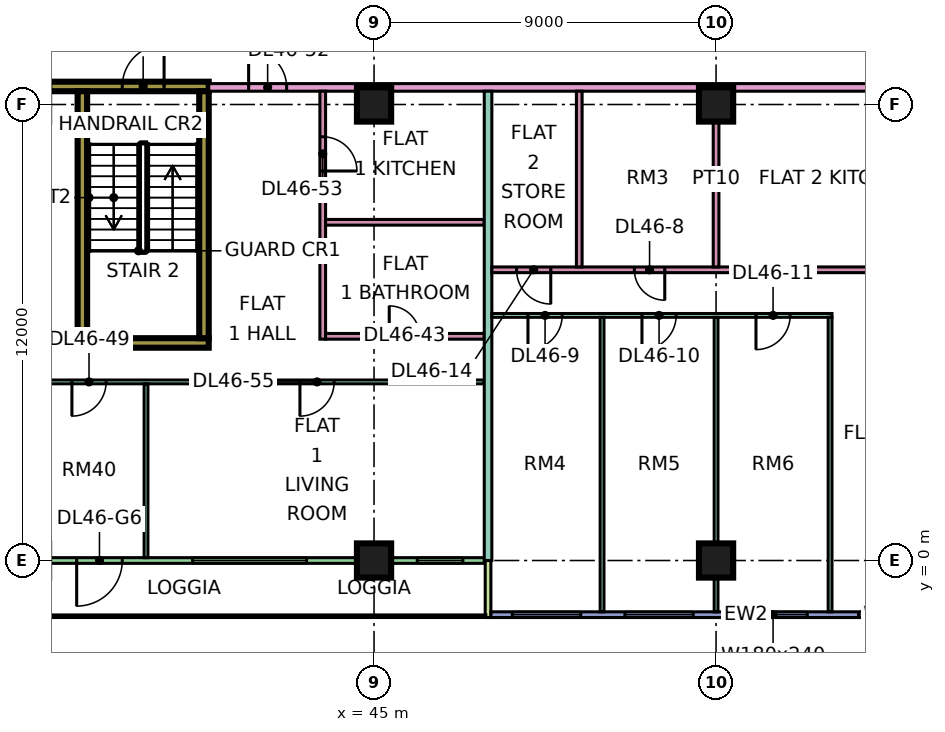
"""IFC4 building model, lengths in metres.
Left out: names, types, materials, properties, quantities, classifications, styles, units other than length and angle.
Written with IfcOpenShell. Run it as: python <this file> out.ifc"""

import sys

from ifc_helpers import new_model, si_unit, direction, frame, frame_2d, origin, origin_2d, place, context, subcontext, project, spatial, rectangle, extrude, element, fill, save


model = new_model("IFC4")
c1 = context("Model", 3, precision=1e-05, world=origin(), true_north=direction((0.0, 1.0)))
c2 = subcontext(c1, "Body", "Model", "MODEL_VIEW")
j1 = project(units=[si_unit("LENGTHUNIT", "METRE"), si_unit("PLANEANGLEUNIT", "RADIAN")], contexts=[c1])
p1 = place(None, origin())
s1 = spatial("IfcSite", under=j1, at=p1, CompositionType="ELEMENT")
p2 = place(p1, origin())
s2 = spatial("IfcBuilding", under=s1, at=p2, CompositionType="ELEMENT")
p3 = place(p2, frame((0.0, 0.0, 198.65)))
s3 = spatial("IfcBuildingStorey", under=s2, at=p3, CompositionType="ELEMENT", Elevation=198.65)
for number, where, z_axis, x_axis in (
    (1, (45.0, 0.0, 0.0), (0.0, 0.0, 1.0), (1.0, 0.0, 0.0)),
    (2, (45.0, 12.0, 0.0), (0.0, 0.0, 1.0), (1.0, 0.0, 0.0)),
    (3, (54.0, 0.0, 0.0), (0.0, 0.0, 1.0), (1.0, 0.0, 0.0)),
    (4, (54.0, 12.0, 0.0), (0.0, 0.0, 1.0), (1.0, 0.0, 0.0)),
):
    element("IfcColumn", number, at=place(p3, frame(where, z_axis=z_axis, x_axis=x_axis)), inside=s3, PredefinedType="COLUMN", context=c2, shape_type="SweptSolid", body=[
        extrude(rectangle(XDim=0.9, YDim=0.9, at=origin_2d()), origin(), (0.0, 0.0, 1.0), 3.75),
    ])
p4 = place(p3, frame((37.2, 5.725, 0.0), z_axis=(0.0, 0.0, 1.0), x_axis=(1.0, 0.0, 0.0)))
e5 = element("IfcWall", 5, at=p4, inside=s3, PredefinedType="SHEAR", context=c2, shape_type="SweptSolid", body=[
    extrude(rectangle(XDim=3.45, YDim=0.25, at=frame_2d((1.725, 0.0))), origin(), (0.0, 0.0, 1.0), 3.75),
])
p5 = place(p3, frame((36.45, 12.475, 0.0), z_axis=(0.0, 0.0, 1.0), x_axis=(1.0, 0.0, 0.0)))
e6 = element("IfcWall", 6, at=p5, inside=s3, PredefinedType="SHEAR", context=c2, shape_type="SweptSolid", body=[
    extrude(rectangle(XDim=4.2, YDim=0.25, at=frame_2d((2.1, 0.0))), origin(), (0.0, 0.0, 1.0), 3.75),
])
p6 = place(p5, frame((1.925, 0.0, 0.0)))
e7 = element("IfcOpeningElement", 7, at=p6, cuts=e6, PredefinedType="OPENING", context=c2, shape_type="SweptSolid", body=[
    extrude(rectangle(XDim=1.1, YDim=2.2, at=frame_2d((0.55, 1.1))), frame((0.0, 0.135, 0.0), z_axis=(0.0, -1.0, 0.0), x_axis=(1.0, 0.0, 0.0)), (0.0, 0.0, 1.0), 0.27),
])
for number, where, z_axis, x_axis in (
    (8, (37.325, 5.85, 0.0), (0.0, 0.0, 1.0), (0.0, 1.0, 0.0)),
    (9, (40.525, 5.85, 0.0), (0.0, 0.0, 1.0), (0.0, 1.0, 0.0)),
):
    element("IfcWall", number, at=place(p3, frame(where, z_axis=z_axis, x_axis=x_axis)), inside=s3, PredefinedType="SHEAR", context=c2, shape_type="SweptSolid", body=[
        extrude(rectangle(XDim=6.5, YDim=0.25, at=frame_2d((3.25, 0.0))), origin(), (0.0, 0.0, 1.0), 3.75),
    ])
p7 = place(p3, frame((36.075, 0.0, 0.0), z_axis=(0.0, 0.0, 1.0), x_axis=(1.0, 0.0, 0.0)))
e10 = element("IfcWall", 10, at=p7, inside=s3, PredefinedType="SOLIDWALL", context=c2, shape_type="SweptSolid", body=[
    extrude(rectangle(XDim=11.85, YDim=0.15, at=frame_2d((5.925, 0.0))), origin(), (0.0, 0.0, 1.0), 3.35),
])
p8 = place(p7, frame((1.1, 0.0, 0.0)))
e11 = element("IfcOpeningElement", 11, at=p8, cuts=e10, PredefinedType="OPENING", context=c2, shape_type="SweptSolid", body=[
    extrude(rectangle(XDim=1.2, YDim=2.4, at=frame_2d((0.6, 1.2))), frame((0.0, 0.085, 0.0), z_axis=(0.0, -1.0, 0.0), x_axis=(1.0, 0.0, 0.0)), (0.0, 0.0, 1.0), 0.17),
])
p9 = place(p7, frame((4.15, 0.0, 0.45)))
e12 = element("IfcOpeningElement", 12, at=p9, cuts=e10, PredefinedType="OPENING", context=c2, shape_type="SweptSolid", body=[
    extrude(rectangle(XDim=3.0, YDim=2.4, at=frame_2d((1.5, 1.2))), frame((0.0, 0.085, 0.0), z_axis=(0.0, -1.0, 0.0), x_axis=(1.0, 0.0, 0.0)), (0.0, 0.0, 1.0), 0.17),
])
p10 = place(p7, frame((10.062, 0.0, 0.45)))
e13 = element("IfcOpeningElement", 13, at=p10, cuts=e10, PredefinedType="OPENING", context=c2, shape_type="SweptSolid", body=[
    extrude(rectangle(XDim=1.2, YDim=2.4, at=frame_2d((0.6, 1.2))), frame((0.0, 0.085, 0.0), z_axis=(0.0, -1.0, 0.0), x_axis=(1.0, 0.0, 0.0)), (0.0, 0.0, 1.0), 0.17),
])
p11 = place(p3, frame((48.0, -1.5, 0.0), z_axis=(0.0, 0.0, 1.0), x_axis=(0.0, 1.0, 0.0)))
e14 = element("IfcWall", 14, at=p11, inside=s3, PredefinedType="SOLIDWALL", context=c2, shape_type="SweptSolid", body=[
    extrude(rectangle(XDim=1.5, YDim=0.15, at=frame_2d((0.75, 0.0))), origin(), (0.0, 0.0, 1.0), 3.35),
])
p12 = place(p3, frame((48.075, -1.425, 0.0), z_axis=(0.0, 0.0, 1.0), x_axis=(1.0, 0.0, 0.0)))
e15 = element("IfcWall", 15, at=p12, inside=s3, PredefinedType="SOLIDWALL", context=c2, shape_type="SweptSolid", body=[
    extrude(rectangle(XDim=13.425, YDim=0.15, at=frame_2d((6.712, 0.0))), origin(), (0.0, 0.0, 1.0), 3.35),
])
p13 = place(p12, frame((0.562, 0.0, 0.45)))
e16 = element("IfcOpeningElement", 16, at=p13, cuts=e15, PredefinedType="OPENING", context=c2, shape_type="SweptSolid", body=[
    extrude(rectangle(XDim=1.8, YDim=2.4, at=frame_2d((0.9, 1.2))), frame((0.0, 0.085, 0.0), z_axis=(0.0, -1.0, 0.0), x_axis=(1.0, 0.0, 0.0)), (0.0, 0.0, 1.0), 0.17),
])
p14 = place(p12, frame((3.525, 0.0, 0.45)))
e17 = element("IfcOpeningElement", 17, at=p14, cuts=e15, PredefinedType="OPENING", context=c2, shape_type="SweptSolid", body=[
    extrude(rectangle(XDim=1.8, YDim=2.4, at=frame_2d((0.9, 1.2))), frame((0.0, 0.085, 0.0), z_axis=(0.0, -1.0, 0.0), x_axis=(1.0, 0.0, 0.0)), (0.0, 0.0, 1.0), 0.17),
])
p15 = place(p12, frame((6.525, 0.0, 0.45)))
e18 = element("IfcOpeningElement", 18, at=p15, cuts=e15, PredefinedType="OPENING", context=c2, shape_type="SweptSolid", body=[
    extrude(rectangle(XDim=1.8, YDim=2.4, at=frame_2d((0.9, 1.2))), frame((0.0, 0.085, 0.0), z_axis=(0.0, -1.0, 0.0), x_axis=(1.0, 0.0, 0.0)), (0.0, 0.0, 1.0), 0.17),
])
p16 = place(p12, frame((9.675, 0.0, 0.45)))
e19 = element("IfcOpeningElement", 19, at=p16, cuts=e15, PredefinedType="OPENING", context=c2, shape_type="SweptSolid", body=[
    extrude(rectangle(XDim=3.0, YDim=2.4, at=frame_2d((1.5, 1.2))), frame((0.0, 0.085, 0.0), z_axis=(0.0, -1.0, 0.0), x_axis=(1.0, 0.0, 0.0)), (0.0, 0.0, 1.0), 0.17),
])
p17 = place(p3, frame((33.05, 4.7, 0.0), z_axis=(0.0, 0.0, 1.0), x_axis=(1.0, 0.0, 0.0)))
e20 = element("IfcWall", 20, at=p17, inside=s3, PredefinedType="PARTITIONING", context=c2, shape_type="SweptSolid", body=[
    extrude(rectangle(XDim=14.85, YDim=0.1, at=frame_2d((7.425, 0.0))), origin(), (0.0, 0.0, 1.0), 3.35),
])
p18 = place(p17, frame((1.0, 0.0, 0.0)))
e21 = element("IfcOpeningElement", 21, at=p18, cuts=e20, PredefinedType="OPENING", context=c2, shape_type="SweptSolid", body=[
    extrude(rectangle(XDim=0.9, YDim=2.1, at=frame_2d((0.45, 1.05))), frame((0.0, 0.06, 0.0), z_axis=(0.0, -1.0, 0.0), x_axis=(1.0, 0.0, 0.0)), (0.0, 0.0, 1.0), 0.12),
])
p19 = place(p17, frame((4.0, 0.0, 0.0)))
e22 = element("IfcOpeningElement", 22, at=p19, cuts=e20, PredefinedType="OPENING", context=c2, shape_type="SweptSolid", body=[
    extrude(rectangle(XDim=0.9, YDim=2.1, at=frame_2d((0.45, 1.05))), frame((0.0, 0.06, 0.0), z_axis=(0.0, -1.0, 0.0), x_axis=(1.0, 0.0, 0.0)), (0.0, 0.0, 1.0), 0.12),
])
p20 = place(p17, frame((10.0, 0.0, 0.0)))
e23 = element("IfcOpeningElement", 23, at=p20, cuts=e20, PredefinedType="OPENING", context=c2, shape_type="SweptSolid", body=[
    extrude(rectangle(XDim=0.9, YDim=2.1, at=frame_2d((0.45, 1.05))), frame((0.0, 0.06, 0.0), z_axis=(0.0, -1.0, 0.0), x_axis=(1.0, 0.0, 0.0)), (0.0, 0.0, 1.0), 0.12),
])
p21 = place(p3, frame((39.0, 0.074, 0.0), z_axis=(0.0, 0.0, 1.0), x_axis=(0.0, 1.0, 0.0)))
e24 = element("IfcWall", 24, at=p21, inside=s3, PredefinedType="PARTITIONING", context=c2, shape_type="SweptSolid", body=[
    extrude(rectangle(XDim=4.576, YDim=0.1, at=frame_2d((2.288, 0.0))), origin(), (0.0, 0.0, 1.0), 3.35),
])
p22 = place(p3, frame((40.65, 12.45, 0.0), z_axis=(0.0, 0.0, 1.0), x_axis=(1.0, 0.0, 0.0)))
e25 = element("IfcWall", 25, at=p22, inside=s3, PredefinedType="PARTITIONING", context=c2, shape_type="SweptSolid", body=[
    extrude(rectangle(XDim=22.276, YDim=0.2, at=frame_2d((11.138, 0.0))), origin(), (0.0, 0.0, 1.0), 3.35),
])
p23 = place(p22, frame((20.55, 0.0, 0.0)))
e26 = element("IfcOpeningElement", 26, at=p23, cuts=e25, PredefinedType="OPENING", context=c2, shape_type="SweptSolid", body=[
    extrude(rectangle(XDim=1.0, YDim=2.1, at=frame_2d((0.5, 1.05))), frame((0.0, 0.11, 0.0), z_axis=(0.0, -1.0, 0.0), x_axis=(1.0, 0.0, 0.0)), (0.0, 0.0, 1.0), 0.22),
])
p24 = place(p22, frame((1.05, 0.0, 0.0)))
e27 = element("IfcOpeningElement", 27, at=p24, cuts=e25, PredefinedType="OPENING", context=c2, shape_type="SweptSolid", body=[
    extrude(rectangle(XDim=1.0, YDim=2.1, at=frame_2d((0.5, 1.05))), frame((0.0, 0.11, 0.0), z_axis=(0.0, -1.0, 0.0), x_axis=(1.0, 0.0, 0.0)), (0.0, 0.0, 1.0), 0.22),
])
p25 = place(p3, frame((43.65, 5.825, 0.0), z_axis=(0.0, 0.0, 1.0), x_axis=(0.0, 1.0, 0.0)))
e28 = element("IfcWall", 28, at=p25, inside=s3, PredefinedType="PARTITIONING", context=c2, shape_type="SweptSolid", body=[
    extrude(rectangle(XDim=6.525, YDim=0.15, at=frame_2d((3.263, 0.0))), origin(), (0.0, 0.0, 1.0), 3.35),
])
p26 = place(p25, frame((4.425, 0.0, 0.0)))
e29 = element("IfcOpeningElement", 29, at=p26, cuts=e28, PredefinedType="OPENING", context=c2, shape_type="SweptSolid", body=[
    extrude(rectangle(XDim=0.9, YDim=2.1, at=frame_2d((0.45, 1.05))), frame((0.0, 0.085, 0.0), z_axis=(0.0, -1.0, 0.0), x_axis=(1.0, 0.0, 0.0)), (0.0, 0.0, 1.0), 0.17),
])
p27 = place(p3, frame((43.725, 5.9, 0.0), z_axis=(0.0, 0.0, 1.0), x_axis=(1.0, 0.0, 0.0)))
e30 = element("IfcWall", 30, at=p27, inside=s3, PredefinedType="PARTITIONING", context=c2, shape_type="SweptSolid", body=[
    extrude(rectangle(XDim=4.175, YDim=0.15, at=frame_2d((2.087, 0.0))), origin(), (0.0, 0.0, 1.0), 3.35),
])
p28 = place(p27, frame((1.675, 0.0, 0.0)))
e31 = element("IfcOpeningElement", 31, at=p28, cuts=e30, PredefinedType="OPENING", context=c2, shape_type="SweptSolid", body=[
    extrude(rectangle(XDim=0.8, YDim=2.1, at=frame_2d((0.4, 1.05))), frame((0.0, 0.085, 0.0), z_axis=(0.0, -1.0, 0.0), x_axis=(1.0, 0.0, 0.0)), (0.0, 0.0, 1.0), 0.17),
])
p29 = place(p3, frame((43.725, 8.9, 0.0), z_axis=(0.0, 0.0, 1.0), x_axis=(1.0, 0.0, 0.0)))
e32 = element("IfcWall", 32, at=p29, inside=s3, PredefinedType="PARTITIONING", context=c2, shape_type="SweptSolid", body=[
    extrude(rectangle(XDim=4.175, YDim=0.15, at=frame_2d((2.087, 0.0))), origin(), (0.0, 0.0, 1.0), 3.35),
])
p30 = place(p3, frame((48.0, 0.0, 0.0), z_axis=(0.0, 0.0, 1.0), x_axis=(0.0, 1.0, 0.0)))
e33 = element("IfcWall", 33, at=p30, inside=s3, PredefinedType="PARTITIONING", context=c2, shape_type="SweptSolid", body=[
    extrude(rectangle(XDim=12.35, YDim=0.2, at=frame_2d((6.175, 0.0))), origin(), (0.0, 0.0, 1.0), 3.35),
])
p31 = place(p3, frame((48.1, 6.45, 0.0), z_axis=(0.0, 0.0, 1.0), x_axis=(1.0, 0.0, 0.0)))
e34 = element("IfcWall", 34, at=p31, inside=s3, PredefinedType="PARTITIONING", context=c2, shape_type="SweptSolid", body=[
    extrude(rectangle(XDim=8.95, YDim=0.1, at=frame_2d((4.475, 0.0))), origin(), (0.0, 0.0, 1.0), 3.35),
])
p32 = place(p31, frame((0.95, 0.0, 0.0)))
e35 = element("IfcOpeningElement", 35, at=p32, cuts=e34, PredefinedType="OPENING", context=c2, shape_type="SweptSolid", body=[
    extrude(rectangle(XDim=0.9, YDim=2.1, at=frame_2d((0.45, 1.05))), frame((0.0, 0.06, 0.0), z_axis=(0.0, -1.0, 0.0), x_axis=(1.0, 0.0, 0.0)), (0.0, 0.0, 1.0), 0.12),
])
p33 = place(p31, frame((3.95, 0.0, 0.0)))
e36 = element("IfcOpeningElement", 36, at=p33, cuts=e34, PredefinedType="OPENING", context=c2, shape_type="SweptSolid", body=[
    extrude(rectangle(XDim=0.9, YDim=2.1, at=frame_2d((0.45, 1.05))), frame((0.0, 0.06, 0.0), z_axis=(0.0, -1.0, 0.0), x_axis=(1.0, 0.0, 0.0)), (0.0, 0.0, 1.0), 0.12),
])
p34 = place(p31, frame((6.95, 0.0, 0.0)))
e37 = element("IfcOpeningElement", 37, at=p34, cuts=e34, PredefinedType="OPENING", context=c2, shape_type="SweptSolid", body=[
    extrude(rectangle(XDim=0.9, YDim=2.1, at=frame_2d((0.45, 1.05))), frame((0.0, 0.06, 0.0), z_axis=(0.0, -1.0, 0.0), x_axis=(1.0, 0.0, 0.0)), (0.0, 0.0, 1.0), 0.12),
])
p35 = place(p3, frame((48.1, 7.65, 0.0), z_axis=(0.0, 0.0, 1.0), x_axis=(1.0, 0.0, 0.0)))
e38 = element("IfcWall", 38, at=p35, inside=s3, PredefinedType="PARTITIONING", context=c2, shape_type="SweptSolid", body=[
    extrude(rectangle(XDim=12.25, YDim=0.15, at=frame_2d((6.125, 0.0))), origin(), (0.0, 0.0, 1.0), 3.35),
])
p36 = place(p35, frame((3.75, 0.0, 0.0)))
e39 = element("IfcOpeningElement", 39, at=p36, cuts=e38, PredefinedType="OPENING", context=c2, shape_type="SweptSolid", body=[
    extrude(rectangle(XDim=0.8, YDim=2.1, at=frame_2d((0.4, 1.05))), frame((0.0, 0.085, 0.0), z_axis=(0.0, -1.0, 0.0), x_axis=(1.0, 0.0, 0.0)), (0.0, 0.0, 1.0), 0.17),
])
p37 = place(p35, frame((0.65, 0.0, 0.0)))
e40 = element("IfcOpeningElement", 40, at=p37, cuts=e38, PredefinedType="OPENING", context=c2, shape_type="SweptSolid", body=[
    extrude(rectangle(XDim=0.9, YDim=2.1, at=frame_2d((0.45, 1.05))), frame((0.0, 0.085, 0.0), z_axis=(0.0, -1.0, 0.0), x_axis=(1.0, 0.0, 0.0)), (0.0, 0.0, 1.0), 0.17),
])
p38 = place(p3, frame((50.4, 7.725, 0.0), z_axis=(0.0, 0.0, 1.0), x_axis=(0.0, 1.0, 0.0)))
e41 = element("IfcWall", 41, at=p38, inside=s3, PredefinedType="PARTITIONING", context=c2, shape_type="SweptSolid", body=[
    extrude(rectangle(XDim=4.625, YDim=0.15, at=frame_2d((2.312, 0.0))), origin(), (0.0, 0.0, 1.0), 3.35),
])
for number, where, z_axis, x_axis in (
    (42, (51.0, -1.351, 0.0), (0.0, 0.0, 1.0), (0.0, 1.0, 0.0)),
    (43, (54.0, -1.351, 0.0), (0.0, 0.0, 1.0), (0.0, 1.0, 0.0)),
):
    element("IfcWall", number, at=place(p3, frame(where, z_axis=z_axis, x_axis=x_axis)), inside=s3, PredefinedType="PARTITIONING", context=c2, shape_type="SweptSolid", body=[
        extrude(rectangle(XDim=7.751, YDim=0.1, at=frame_2d((3.875, 0.0))), origin(), (0.0, 0.0, 1.0), 3.35),
    ])
p39 = place(p3, frame((54.0, 7.725, 0.0), z_axis=(0.0, 0.0, 1.0), x_axis=(0.0, 1.0, 0.0)))
e44 = element("IfcWall", 44, at=p39, inside=s3, PredefinedType="PARTITIONING", context=c2, shape_type="SweptSolid", body=[
    extrude(rectangle(XDim=4.625, YDim=0.15, at=frame_2d((2.312, 0.0))), origin(), (0.0, 0.0, 1.0), 3.35),
])
p40 = place(p3, frame((57.0, -1.35, 0.0), z_axis=(0.0, 0.0, 1.0), x_axis=(0.0, 1.0, 0.0)))
e45 = element("IfcWall", 45, at=p40, inside=s3, PredefinedType="PARTITIONING", context=c2, shape_type="SweptSolid", body=[
    extrude(rectangle(XDim=7.75, YDim=0.1, at=frame_2d((3.875, 0.0))), origin(), (0.0, 0.0, 1.0), 3.35),
])
p41 = place(p8, frame((1.2, 0.0, 0.0), z_axis=(0.0, 0.0, 1.0), x_axis=(-1.0, 0.0, 0.0)))
e46 = element("IfcDoor", 46, at=p41, inside=s3, OperationType="DOUBLE_DOOR_SINGLE_SWING", PredefinedType="DOOR", context=c2, shape_type="SweptSolid", body=[
    extrude(rectangle(XDim=1.2, YDim=2.4, at=frame_2d((0.6, 1.2))), frame((0.0, 0.025, 0.0), z_axis=(0.0, -1.0, 0.0), x_axis=(1.0, 0.0, 0.0)), (0.0, 0.0, 1.0), 0.05),
])
fill(e11, e46)
p42 = place(p9, origin())
e47 = element("IfcWindow", 47, at=p42, inside=s3, PartitioningType="SINGLE_PANEL", PredefinedType="WINDOW", context=c2, shape_type="SweptSolid", body=[
    extrude(rectangle(XDim=3.0, YDim=2.4, at=frame_2d((1.5, 1.2))), frame((0.0, 0.03, 0.0), z_axis=(0.0, -1.0, 0.0), x_axis=(1.0, 0.0, 0.0)), (0.0, 0.0, 1.0), 0.06),
])
fill(e12, e47)
p43 = place(p10, origin())
e48 = element("IfcWindow", 48, at=p43, inside=s3, PartitioningType="SINGLE_PANEL", PredefinedType="WINDOW", context=c2, shape_type="SweptSolid", body=[
    extrude(rectangle(XDim=1.2, YDim=2.4, at=frame_2d((0.6, 1.2))), frame((0.0, 0.03, 0.0), z_axis=(0.0, -1.0, 0.0), x_axis=(1.0, 0.0, 0.0)), (0.0, 0.0, 1.0), 0.06),
])
fill(e13, e48)
p44 = place(p13, origin())
e49 = element("IfcWindow", 49, at=p44, inside=s3, PartitioningType="SINGLE_PANEL", PredefinedType="WINDOW", context=c2, shape_type="SweptSolid", body=[
    extrude(rectangle(XDim=1.8, YDim=2.4, at=frame_2d((0.9, 1.2))), frame((0.0, 0.03, 0.0), z_axis=(0.0, -1.0, 0.0), x_axis=(1.0, 0.0, 0.0)), (0.0, 0.0, 1.0), 0.06),
])
fill(e16, e49)
p45 = place(p14, origin())
e50 = element("IfcWindow", 50, at=p45, inside=s3, PartitioningType="SINGLE_PANEL", PredefinedType="WINDOW", context=c2, shape_type="SweptSolid", body=[
    extrude(rectangle(XDim=1.8, YDim=2.4, at=frame_2d((0.9, 1.2))), frame((0.0, 0.03, 0.0), z_axis=(0.0, -1.0, 0.0), x_axis=(1.0, 0.0, 0.0)), (0.0, 0.0, 1.0), 0.06),
])
fill(e17, e50)
p46 = place(p15, origin())
e51 = element("IfcWindow", 51, at=p46, inside=s3, PartitioningType="SINGLE_PANEL", PredefinedType="WINDOW", context=c2, shape_type="SweptSolid", body=[
    extrude(rectangle(XDim=1.8, YDim=2.4, at=frame_2d((0.9, 1.2))), frame((0.0, 0.03, 0.0), z_axis=(0.0, -1.0, 0.0), x_axis=(1.0, 0.0, 0.0)), (0.0, 0.0, 1.0), 0.06),
])
fill(e18, e51)
p47 = place(p16, origin())
e52 = element("IfcWindow", 52, at=p47, inside=s3, PartitioningType="SINGLE_PANEL", PredefinedType="WINDOW", context=c2, shape_type="SweptSolid", body=[
    extrude(rectangle(XDim=3.0, YDim=2.4, at=frame_2d((1.5, 1.2))), frame((0.0, 0.03, 0.0), z_axis=(0.0, -1.0, 0.0), x_axis=(1.0, 0.0, 0.0)), (0.0, 0.0, 1.0), 0.06),
])
fill(e19, e52)
p48 = place(p6, frame((1.1, 0.0, 0.0), z_axis=(0.0, 0.0, 1.0), x_axis=(-1.0, 0.0, 0.0)))
e53 = element("IfcDoor", 53, at=p48, inside=s3, OperationType="SINGLE_SWING_RIGHT", PredefinedType="DOOR", context=c2, shape_type="SweptSolid", body=[
    extrude(rectangle(XDim=1.1, YDim=2.2, at=frame_2d((0.55, 1.1))), frame((0.0, 0.025, 0.0), z_axis=(0.0, -1.0, 0.0), x_axis=(1.0, 0.0, 0.0)), (0.0, 0.0, 1.0), 0.05),
])
fill(e7, e53)
p49 = place(p36, origin())
e54 = element("IfcDoor", 54, at=p49, inside=s3, OperationType="SINGLE_SWING_RIGHT", PredefinedType="DOOR", context=c2, shape_type="SweptSolid", body=[
    extrude(rectangle(XDim=0.8, YDim=2.1, at=frame_2d((0.4, 1.05))), frame((0.0, 0.025, 0.0), z_axis=(0.0, -1.0, 0.0), x_axis=(1.0, 0.0, 0.0)), (0.0, 0.0, 1.0), 0.05),
])
fill(e39, e54)
p50 = place(p32, frame((0.9, 0.0, 0.0), z_axis=(0.0, 0.0, 1.0), x_axis=(-1.0, 0.0, 0.0)))
e55 = element("IfcDoor", 55, at=p50, inside=s3, OperationType="SINGLE_SWING_LEFT", PredefinedType="DOOR", context=c2, shape_type="SweptSolid", body=[
    extrude(rectangle(XDim=0.9, YDim=2.1, at=frame_2d((0.45, 1.05))), frame((0.0, 0.025, 0.0), z_axis=(0.0, -1.0, 0.0), x_axis=(1.0, 0.0, 0.0)), (0.0, 0.0, 1.0), 0.05),
])
fill(e35, e55)
p51 = place(p33, frame((0.9, 0.0, 0.0), z_axis=(0.0, 0.0, 1.0), x_axis=(-1.0, 0.0, 0.0)))
e56 = element("IfcDoor", 56, at=p51, inside=s3, OperationType="SINGLE_SWING_LEFT", PredefinedType="DOOR", context=c2, shape_type="SweptSolid", body=[
    extrude(rectangle(XDim=0.9, YDim=2.1, at=frame_2d((0.45, 1.05))), frame((0.0, 0.025, 0.0), z_axis=(0.0, -1.0, 0.0), x_axis=(1.0, 0.0, 0.0)), (0.0, 0.0, 1.0), 0.05),
])
fill(e36, e56)
p52 = place(p34, frame((0.9, 0.0, 0.0), z_axis=(0.0, 0.0, 1.0), x_axis=(-1.0, 0.0, 0.0)))
e57 = element("IfcDoor", 57, at=p52, inside=s3, OperationType="SINGLE_SWING_LEFT", PredefinedType="DOOR", context=c2, shape_type="SweptSolid", body=[
    extrude(rectangle(XDim=0.9, YDim=2.1, at=frame_2d((0.45, 1.05))), frame((0.0, 0.025, 0.0), z_axis=(0.0, -1.0, 0.0), x_axis=(1.0, 0.0, 0.0)), (0.0, 0.0, 1.0), 0.05),
])
fill(e37, e57)
p53 = place(p37, origin())
e58 = element("IfcDoor", 58, at=p53, inside=s3, OperationType="SINGLE_SWING_RIGHT", PredefinedType="DOOR", context=c2, shape_type="SweptSolid", body=[
    extrude(rectangle(XDim=0.9, YDim=2.1, at=frame_2d((0.45, 1.05))), frame((0.0, 0.025, 0.0), z_axis=(0.0, -1.0, 0.0), x_axis=(1.0, 0.0, 0.0)), (0.0, 0.0, 1.0), 0.05),
])
fill(e40, e58)
p54 = place(p28, origin())
e59 = element("IfcDoor", 59, at=p54, inside=s3, OperationType="SINGLE_SWING_LEFT", PredefinedType="DOOR", context=c2, shape_type="SweptSolid", body=[
    extrude(rectangle(XDim=0.8, YDim=2.1, at=frame_2d((0.4, 1.05))), frame((0.0, 0.025, 0.0), z_axis=(0.0, -1.0, 0.0), x_axis=(1.0, 0.0, 0.0)), (0.0, 0.0, 1.0), 0.05),
])
fill(e31, e59)
p55 = place(p19, frame((0.9, 0.0, 0.0), z_axis=(0.0, 0.0, 1.0), x_axis=(-1.0, 0.0, 0.0)))
e60 = element("IfcDoor", 60, at=p55, inside=s3, OperationType="SINGLE_SWING_LEFT", PredefinedType="DOOR", context=c2, shape_type="SweptSolid", body=[
    extrude(rectangle(XDim=0.9, YDim=2.1, at=frame_2d((0.45, 1.05))), frame((0.0, 0.025, 0.0), z_axis=(0.0, -1.0, 0.0), x_axis=(1.0, 0.0, 0.0)), (0.0, 0.0, 1.0), 0.05),
])
fill(e22, e60)
p56 = place(p24, origin())
e61 = element("IfcDoor", 61, at=p56, inside=s3, OperationType="SINGLE_SWING_LEFT", PredefinedType="DOOR", context=c2, shape_type="SweptSolid", body=[
    extrude(rectangle(XDim=1.0, YDim=2.1, at=frame_2d((0.5, 1.05))), frame((0.0, 0.025, 0.0), z_axis=(0.0, -1.0, 0.0), x_axis=(1.0, 0.0, 0.0)), (0.0, 0.0, 1.0), 0.05),
])
fill(e27, e61)
p57 = place(p26, frame((0.9, 0.0, 0.0), z_axis=(0.0, 0.0, 1.0), x_axis=(-1.0, 0.0, 0.0)))
e62 = element("IfcDoor", 62, at=p57, inside=s3, OperationType="SINGLE_SWING_LEFT", PredefinedType="DOOR", context=c2, shape_type="SweptSolid", body=[
    extrude(rectangle(XDim=0.9, YDim=2.1, at=frame_2d((0.45, 1.05))), frame((0.0, 0.025, 0.0), z_axis=(0.0, -1.0, 0.0), x_axis=(1.0, 0.0, 0.0)), (0.0, 0.0, 1.0), 0.05),
])
fill(e29, e62)
p58 = place(p20, frame((0.9, 0.0, 0.0), z_axis=(0.0, 0.0, 1.0), x_axis=(-1.0, 0.0, 0.0)))
e63 = element("IfcDoor", 63, at=p58, inside=s3, OperationType="SINGLE_SWING_LEFT", PredefinedType="DOOR", context=c2, shape_type="SweptSolid", body=[
    extrude(rectangle(XDim=0.9, YDim=2.1, at=frame_2d((0.45, 1.05))), frame((0.0, 0.025, 0.0), z_axis=(0.0, -1.0, 0.0), x_axis=(1.0, 0.0, 0.0)), (0.0, 0.0, 1.0), 0.05),
])
fill(e23, e63)
save(model, sys.argv[1])
